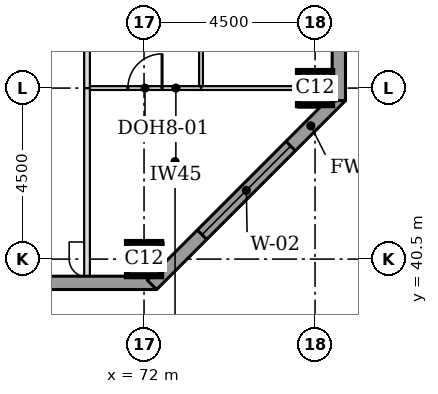
"""IFC4 building model, lengths in metres.
Left out: names, types, materials, properties, quantities, classifications, styles, units other than length and angle.
Written with IfcOpenShell. Run it as: python <this file> out.ifc"""

import sys

from ifc_helpers import new_model, si_unit, direction, frame, frame_2d, origin, origin_2d, place, context, subcontext, project, spatial, rectangle, extrude, element, fill, save


model = new_model("IFC4")
c1 = context("Model", 3, precision=1e-05, world=origin(), true_north=direction((0.0, 1.0)))
c2 = subcontext(c1, "Body", "Model", "MODEL_VIEW")
j1 = project(units=[si_unit("LENGTHUNIT", "METRE"), si_unit("PLANEANGLEUNIT", "RADIAN")], contexts=[c1])
p1 = place(None, origin())
s1 = spatial("IfcSite", under=j1, at=p1, CompositionType="ELEMENT")
p2 = place(p1, origin())
s2 = spatial("IfcBuilding", under=s1, at=p2, CompositionType="ELEMENT")
p3 = place(p2, frame((0.0, 0.0, 203.2)))
s3 = spatial("IfcBuildingStorey", under=s2, at=p3, CompositionType="ELEMENT", Elevation=203.2)
for number, where, z_axis, x_axis in (
    (1, (72.0, 40.5, 0.0), (0.0, 0.0, 1.0), (1.0, 0.0, 0.0)),
    (2, (76.5, 45.0, 0.0), (0.0, 0.0, 1.0), (1.0, 0.0, 0.0)),
):
    element("IfcColumn", number, at=place(p3, frame(where, z_axis=z_axis, x_axis=x_axis)), inside=s3, PredefinedType="COLUMN", context=c2, shape_type="SweptSolid", body=[
        extrude(rectangle(XDim=0.9, YDim=0.9, at=origin_2d()), origin(), (0.0, 0.0, 1.0), 3.7),
    ])
p4 = place(p3, frame((36.0, 39.875, 0.0), z_axis=(0.0, 0.0, 1.0), x_axis=(1.0, 0.0, 0.0)))
e3 = element("IfcWall", 3, at=p4, inside=s3, PredefinedType="STANDARD", context=c2, shape_type="SweptSolid", body=[
    extrude(rectangle(XDim=36.331, YDim=0.35, at=frame_2d((18.166, 0.0))), origin(), (0.0, 0.0, 1.0), 3.525),
])
p5 = place(p4, frame((5.1, 0.0, 0.9)))
e4 = element("IfcOpeningElement", 4, at=p5, cuts=e3, PredefinedType="OPENING", context=c2, shape_type="SweptSolid", body=[
    extrude(rectangle(XDim=3.3, YDim=1.9, at=frame_2d((1.65, 0.95))), frame((0.0, 0.185, 0.0), z_axis=(0.0, -1.0, 0.0), x_axis=(1.0, 0.0, 0.0)), (0.0, 0.0, 1.0), 0.37),
])
p6 = place(p4, frame((9.6, 0.0, 0.9)))
e5 = element("IfcOpeningElement", 5, at=p6, cuts=e3, PredefinedType="OPENING", context=c2, shape_type="SweptSolid", body=[
    extrude(rectangle(XDim=3.3, YDim=1.9, at=frame_2d((1.65, 0.95))), frame((0.0, 0.185, 0.0), z_axis=(0.0, -1.0, 0.0), x_axis=(1.0, 0.0, 0.0)), (0.0, 0.0, 1.0), 0.37),
])
p7 = place(p4, frame((14.1, 0.0, 0.9)))
e6 = element("IfcOpeningElement", 6, at=p7, cuts=e3, PredefinedType="OPENING", context=c2, shape_type="SweptSolid", body=[
    extrude(rectangle(XDim=3.3, YDim=1.9, at=frame_2d((1.65, 0.95))), frame((0.0, 0.185, 0.0), z_axis=(0.0, -1.0, 0.0), x_axis=(1.0, 0.0, 0.0)), (0.0, 0.0, 1.0), 0.37),
])
p8 = place(p4, frame((18.6, 0.0, 0.9)))
e7 = element("IfcOpeningElement", 7, at=p8, cuts=e3, PredefinedType="OPENING", context=c2, shape_type="SweptSolid", body=[
    extrude(rectangle(XDim=3.3, YDim=1.9, at=frame_2d((1.65, 0.95))), frame((0.0, 0.185, 0.0), z_axis=(0.0, -1.0, 0.0), x_axis=(1.0, 0.0, 0.0)), (0.0, 0.0, 1.0), 0.37),
])
p9 = place(p4, frame((23.1, 0.0, 0.9)))
e8 = element("IfcOpeningElement", 8, at=p9, cuts=e3, PredefinedType="OPENING", context=c2, shape_type="SweptSolid", body=[
    extrude(rectangle(XDim=3.3, YDim=1.9, at=frame_2d((1.65, 0.95))), frame((0.0, 0.185, 0.0), z_axis=(0.0, -1.0, 0.0), x_axis=(1.0, 0.0, 0.0)), (0.0, 0.0, 1.0), 0.37),
])
p10 = place(p4, frame((27.6, 0.0, 0.9)))
e9 = element("IfcOpeningElement", 9, at=p10, cuts=e3, PredefinedType="OPENING", context=c2, shape_type="SweptSolid", body=[
    extrude(rectangle(XDim=3.3, YDim=1.9, at=frame_2d((1.65, 0.95))), frame((0.0, 0.185, 0.0), z_axis=(0.0, -1.0, 0.0), x_axis=(1.0, 0.0, 0.0)), (0.0, 0.0, 1.0), 0.37),
])
p11 = place(p3, frame((72.208, 39.824, 0.0), z_axis=(0.0, 0.0, 1.0), x_axis=(0.707106781187, 0.707106781187, 0.0)))
e10 = element("IfcWall", 10, at=p11, inside=s3, PredefinedType="STANDARD", context=c2, shape_type="SweptSolid", body=[
    extrude(rectangle(XDim=7.027, YDim=0.35, at=frame_2d((3.513, 0.0))), origin(), (0.0, 0.0, 1.0), 3.525),
])
p12 = place(p11, frame((1.863, 0.0, 0.9)))
e11 = element("IfcOpeningElement", 11, at=p12, cuts=e10, PredefinedType="OPENING", context=c2, shape_type="SweptSolid", body=[
    extrude(rectangle(XDim=3.3, YDim=1.9, at=frame_2d((1.65, 0.95))), frame((0.0, 0.185, 0.0), z_axis=(0.0, -1.0, 0.0), x_axis=(1.0, 0.0, 0.0)), (0.0, 0.0, 1.0), 0.37),
])
p13 = place(p3, frame((77.125, 44.669, 0.0), z_axis=(0.0, 0.0, 1.0), x_axis=(0.0, 1.0, 0.0)))
e12 = element("IfcWall", 12, at=p13, inside=s3, PredefinedType="STANDARD", context=c2, shape_type="SweptSolid", body=[
    extrude(rectangle(XDim=32.163, YDim=0.35, at=frame_2d((16.081, 0.0))), origin(), (0.0, 0.0, 1.0), 3.525),
])
p14 = place(p13, frame((5.431, 0.0, 0.9)))
e13 = element("IfcOpeningElement", 13, at=p14, cuts=e12, PredefinedType="OPENING", context=c2, shape_type="SweptSolid", body=[
    extrude(rectangle(XDim=3.3, YDim=1.9, at=frame_2d((1.65, 0.95))), frame((0.0, 0.185, 0.0), z_axis=(0.0, -1.0, 0.0), x_axis=(1.0, 0.0, 0.0)), (0.0, 0.0, 1.0), 0.37),
])
p15 = place(p13, frame((9.931, 0.0, 0.9)))
e14 = element("IfcOpeningElement", 14, at=p15, cuts=e12, PredefinedType="OPENING", context=c2, shape_type="SweptSolid", body=[
    extrude(rectangle(XDim=3.3, YDim=1.9, at=frame_2d((1.65, 0.95))), frame((0.0, 0.185, 0.0), z_axis=(0.0, -1.0, 0.0), x_axis=(1.0, 0.0, 0.0)), (0.0, 0.0, 1.0), 0.37),
])
p16 = place(p13, frame((14.431, 0.0, 0.9)))
e15 = element("IfcOpeningElement", 15, at=p16, cuts=e12, PredefinedType="OPENING", context=c2, shape_type="SweptSolid", body=[
    extrude(rectangle(XDim=3.3, YDim=1.9, at=frame_2d((1.65, 0.95))), frame((0.0, 0.185, 0.0), z_axis=(0.0, -1.0, 0.0), x_axis=(1.0, 0.0, 0.0)), (0.0, 0.0, 1.0), 0.37),
])
p17 = place(p13, frame((18.931, 0.0, 0.9)))
e16 = element("IfcOpeningElement", 16, at=p17, cuts=e12, PredefinedType="OPENING", context=c2, shape_type="SweptSolid", body=[
    extrude(rectangle(XDim=3.3, YDim=1.9, at=frame_2d((1.65, 0.95))), frame((0.0, 0.185, 0.0), z_axis=(0.0, -1.0, 0.0), x_axis=(1.0, 0.0, 0.0)), (0.0, 0.0, 1.0), 0.37),
])
p18 = place(p13, frame((23.431, 0.0, 0.9)))
e17 = element("IfcOpeningElement", 17, at=p18, cuts=e12, PredefinedType="OPENING", context=c2, shape_type="SweptSolid", body=[
    extrude(rectangle(XDim=3.3, YDim=1.9, at=frame_2d((1.65, 0.95))), frame((0.0, 0.185, 0.0), z_axis=(0.0, -1.0, 0.0), x_axis=(1.0, 0.0, 0.0)), (0.0, 0.0, 1.0), 0.37),
])
p19 = place(p3, frame((70.575, 45.0, 0.0), z_axis=(0.0, 0.0, 1.0), x_axis=(1.0, 0.0, 0.0)))
e18 = element("IfcWall", 18, at=p19, inside=s3, PredefinedType="PARTITIONING", context=c2, shape_type="SweptSolid", body=[
    extrude(rectangle(XDim=2.925, YDim=0.1, at=frame_2d((1.462, 0.0))), origin(), (0.0, 0.0, 1.0), 2.948),
])
p20 = place(p19, frame((1.0, 0.0, 0.0)))
e19 = element("IfcOpeningElement", 19, at=p20, cuts=e18, PredefinedType="OPENING", context=c2, shape_type="SweptSolid", body=[
    extrude(rectangle(XDim=0.9, YDim=2.1, at=frame_2d((0.45, 1.05))), frame((0.0, 0.06, 0.0), z_axis=(0.0, -1.0, 0.0), x_axis=(1.0, 0.0, 0.0)), (0.0, 0.0, 1.0), 0.12),
])
p21 = place(p3, frame((73.5, 45.0, 0.0), z_axis=(0.0, 0.0, 1.0), x_axis=(1.0, 0.0, 0.0)))
e20 = element("IfcWall", 20, at=p21, inside=s3, PredefinedType="PARTITIONING", context=c2, shape_type="SweptSolid", body=[
    extrude(rectangle(XDim=2.55, YDim=0.1, at=frame_2d((1.275, 0.0))), origin(), (0.0, 0.0, 1.0), 2.948),
])
p22 = place(p3, frame((70.5, 40.05, 0.0), z_axis=(0.0, 0.0, 1.0), x_axis=(0.0, 1.0, 0.0)))
e21 = element("IfcWall", 21, at=p22, inside=s3, PredefinedType="PARTITIONING", context=c2, shape_type="SweptSolid", body=[
    extrude(rectangle(XDim=4.95, YDim=0.15, at=frame_2d((2.475, 0.0))), origin(), (0.0, 0.0, 1.0), 3.55),
])
p23 = place(p3, frame((70.5, 45.0, 0.0), z_axis=(0.0, 0.0, 1.0), x_axis=(0.0, 1.0, 0.0)))
e22 = element("IfcWall", 22, at=p23, inside=s3, PredefinedType="PARTITIONING", context=c2, shape_type="SweptSolid", body=[
    extrude(rectangle(XDim=24.0, YDim=0.15, at=frame_2d((12.0, 0.0))), origin(), (0.0, 0.0, 1.0), 3.55),
])
p24 = place(p23, frame((11.5, 0.0, 0.0)))
e23 = element("IfcOpeningElement", 23, at=p24, cuts=e22, PredefinedType="OPENING", context=c2, shape_type="SweptSolid", body=[
    extrude(rectangle(XDim=1.0, YDim=2.1, at=frame_2d((0.5, 1.05))), frame((0.0, 0.085, 0.0), z_axis=(0.0, -1.0, 0.0), x_axis=(1.0, 0.0, 0.0)), (0.0, 0.0, 1.0), 0.17),
])
p25 = place(p3, frame((73.5, 45.05, 0.0), z_axis=(0.0, 0.0, 1.0), x_axis=(0.0, 1.0, 0.0)))
e24 = element("IfcWall", 24, at=p25, inside=s3, PredefinedType="PARTITIONING", context=c2, shape_type="SweptSolid", body=[
    extrude(rectangle(XDim=4.45, YDim=0.1, at=frame_2d((2.225, 0.0))), origin(), (0.0, 0.0, 1.0), 3.55),
])
p26 = place(p25, frame((1.8, 0.0, 0.0)))
e25 = element("IfcOpeningElement", 25, at=p26, cuts=e24, PredefinedType="OPENING", context=c2, shape_type="SweptSolid", body=[
    extrude(rectangle(XDim=0.9, YDim=2.1, at=frame_2d((0.45, 1.05))), frame((0.0, 0.06, 0.0), z_axis=(0.0, -1.0, 0.0), x_axis=(1.0, 0.0, 0.0)), (0.0, 0.0, 1.0), 0.12),
])
p27 = place(p12, origin())
e26 = element("IfcWindow", 26, at=p27, inside=s3, PartitioningType="SINGLE_PANEL", PredefinedType="WINDOW", context=c2, shape_type="SweptSolid", body=[
    extrude(rectangle(XDim=3.3, YDim=1.9, at=frame_2d((1.65, 0.95))), frame((0.0, 0.085, 0.0), z_axis=(0.0, -1.0, 0.0), x_axis=(1.0, 0.0, 0.0)), (0.0, 0.0, 1.0), 0.06),
])
fill(e11, e26)
p28 = place(p20, origin())
e27 = element("IfcDoor", 27, at=p28, inside=s3, OperationType="SINGLE_SWING_RIGHT", PredefinedType="DOOR", context=c2, shape_type="SweptSolid", body=[
    extrude(rectangle(XDim=0.9, YDim=2.1, at=frame_2d((0.45, 1.05))), frame((0.0, 0.025, 0.0), z_axis=(0.0, -1.0, 0.0), x_axis=(1.0, 0.0, 0.0)), (0.0, 0.0, 1.0), 0.05),
])
fill(e19, e27)
save(model, sys.argv[1])
